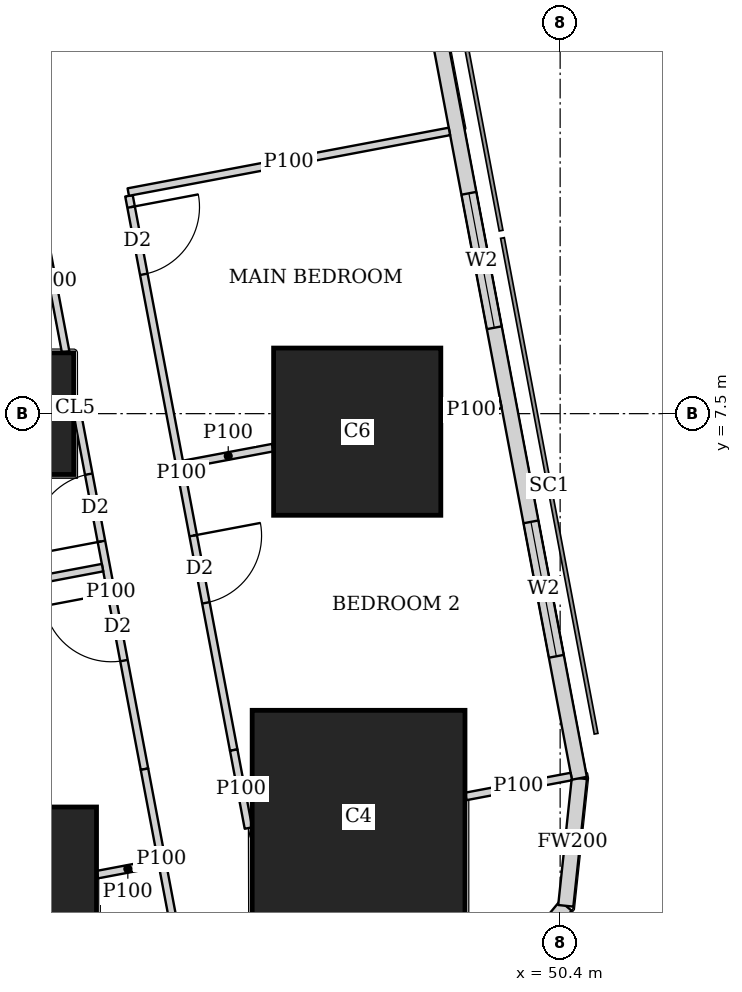
"""IFC4 building model, lengths in metres.
Left out: names, types, materials, properties, quantities, classifications, styles, units other than length and angle.
Written with IfcOpenShell. Run it as: python <this file> out.ifc"""

import sys

from ifc_helpers import new_model, si_unit, direction, frame, frame_2d, origin, origin_2d, place, context, subcontext, project, spatial, rectangle, extrude, element, fill, save


model = new_model("IFC4")
c1 = context("Model", 3, precision=1e-05, world=origin(), true_north=direction((0.0, 1.0)))
c2 = subcontext(c1, "Body", "Model", "MODEL_VIEW")
j1 = project(units=[si_unit("LENGTHUNIT", "METRE"), si_unit("PLANEANGLEUNIT", "RADIAN")], contexts=[c1])
p1 = place(None, origin())
s1 = spatial("IfcSite", under=j1, at=p1, CompositionType="ELEMENT")
p2 = place(p1, origin())
s2 = spatial("IfcBuilding", under=s1, at=p2, CompositionType="ELEMENT")
p3 = place(p2, frame((0.0, 0.0, 81.65)))
s3 = spatial("IfcBuildingStorey", under=s2, at=p3, CompositionType="ELEMENT", Elevation=81.65)
p4 = place(p3, frame((43.2, 1.225, 0.0), z_axis=(0.0, 0.0, 1.0), x_axis=(1.0, 0.0, 0.0)))
e1 = element("IfcColumn", 1, at=p4, inside=s3, PredefinedType="COLUMN", context=c2, shape_type="SweptSolid", body=[
    extrude(rectangle(XDim=2.2, YDim=2.2, at=origin_2d()), origin(), (0.0, 0.0, 1.0), 3.75),
])
p5 = place(p3, frame((47.748, 2.197, 0.0), z_axis=(0.0, 0.0, 1.0), x_axis=(1.0, 0.0, 0.0)))
e2 = element("IfcColumn", 2, at=p5, inside=s3, PredefinedType="COLUMN", context=c2, shape_type="SweptSolid", body=[
    extrude(rectangle(XDim=2.8, YDim=2.8, at=origin_2d()), origin(), (0.0, 0.0, 1.0), 3.75),
])
p6 = place(p3, frame((43.2, 7.5, 0.0), z_axis=(0.0, 0.0, 1.0), x_axis=(1.0, 0.0, 0.0)))
e3 = element("IfcColumn", 3, at=p6, inside=s3, PredefinedType="COLUMN", context=c2, shape_type="SweptSolid", body=[
    extrude(rectangle(XDim=1.6, YDim=1.6, at=origin_2d()), origin(), (0.0, 0.0, 1.0), 3.75),
])
p7 = place(p3, frame((47.73, 7.263, 0.0), z_axis=(0.0, 0.0, 1.0), x_axis=(1.0, 0.0, 0.0)))
e4 = element("IfcColumn", 4, at=p7, inside=s3, PredefinedType="COLUMN", context=c2, shape_type="SweptSolid", body=[
    extrude(rectangle(XDim=2.2, YDim=2.2, at=origin_2d()), origin(), (0.0, 0.0, 1.0), 3.75),
])
p8 = place(p3, frame((49.407, -0.263, 0.0), z_axis=(0.0, 0.0, 1.0), x_axis=(0.638042593423, 0.770001070764, 0.0)))
e5 = element("IfcWall", 5, at=p8, inside=s3, PredefinedType="SOLIDWALL", context=c2, shape_type="SweptSolid", body=[
    extrude(rectangle(XDim=1.673, YDim=0.2, at=frame_2d((0.836, 0.0))), origin(), (0.0, 0.0, 1.0), 3.5),
])
p9 = place(p3, frame((50.474, 1.025, 0.0), z_axis=(0.0, 0.0, 1.0), x_axis=(0.106047815515, 0.994361031429, 0.0)))
e6 = element("IfcWall", 6, at=p9, inside=s3, PredefinedType="SOLIDWALL", context=c2, shape_type="SweptSolid", body=[
    extrude(rectangle(XDim=1.688, YDim=0.2, at=frame_2d((0.844, 0.0))), origin(), (0.0, 0.0, 1.0), 3.5),
])
p10 = place(p3, frame((50.653, 2.703, 0.0), z_axis=(0.0, 0.0, 1.0), x_axis=(-0.185612026696, 0.982623109613, 0.0)))
e7 = element("IfcWall", 7, at=p10, inside=s3, PredefinedType="SOLIDWALL", context=c2, shape_type="SweptSolid", body=[
    extrude(rectangle(XDim=41.393, YDim=0.2, at=frame_2d((20.697, 0.0))), origin(), (0.0, 0.0, 1.0), 3.5),
])
p11 = place(p10, frame((1.633, 0.0, 0.9)))
e8 = element("IfcOpeningElement", 8, at=p11, cuts=e7, PredefinedType="OPENING", context=c2, shape_type="SweptSolid", body=[
    extrude(rectangle(XDim=1.8, YDim=1.5, at=frame_2d((0.9, 0.75))), frame((0.0, 0.11, 0.0), z_axis=(0.0, -1.0, 0.0), x_axis=(1.0, 0.0, 0.0)), (0.0, 0.0, 1.0), 0.22),
])
p12 = place(p10, frame((6.032, 0.0, 0.9)))
e9 = element("IfcOpeningElement", 9, at=p12, cuts=e7, PredefinedType="OPENING", context=c2, shape_type="SweptSolid", body=[
    extrude(rectangle(XDim=1.8, YDim=1.5, at=frame_2d((0.9, 0.75))), frame((0.0, 0.11, 0.0), z_axis=(0.0, -1.0, 0.0), x_axis=(1.0, 0.0, 0.0)), (0.0, 0.0, 1.0), 0.22),
])
p13 = place(p10, frame((9.848, 0.0, 0.9)))
e10 = element("IfcOpeningElement", 10, at=p13, cuts=e7, PredefinedType="OPENING", context=c2, shape_type="SweptSolid", body=[
    extrude(rectangle(XDim=1.8, YDim=1.5, at=frame_2d((0.9, 0.75))), frame((0.0, 0.11, 0.0), z_axis=(0.0, -1.0, 0.0), x_axis=(1.0, 0.0, 0.0)), (0.0, 0.0, 1.0), 0.22),
])
p14 = place(p10, frame((13.664, 0.0, 0.9)))
e11 = element("IfcOpeningElement", 11, at=p14, cuts=e7, PredefinedType="OPENING", context=c2, shape_type="SweptSolid", body=[
    extrude(rectangle(XDim=1.8, YDim=1.5, at=frame_2d((0.9, 0.75))), frame((0.0, 0.11, 0.0), z_axis=(0.0, -1.0, 0.0), x_axis=(1.0, 0.0, 0.0)), (0.0, 0.0, 1.0), 0.22),
])
p15 = place(p10, frame((17.481, 0.0, 0.9)))
e12 = element("IfcOpeningElement", 12, at=p15, cuts=e7, PredefinedType="OPENING", context=c2, shape_type="SweptSolid", body=[
    extrude(rectangle(XDim=1.8, YDim=1.5, at=frame_2d((0.9, 0.75))), frame((0.0, 0.11, 0.0), z_axis=(0.0, -1.0, 0.0), x_axis=(1.0, 0.0, 0.0)), (0.0, 0.0, 1.0), 0.22),
])
p16 = place(p10, frame((21.297, 0.0, 0.9)))
e13 = element("IfcOpeningElement", 13, at=p16, cuts=e7, PredefinedType="OPENING", context=c2, shape_type="SweptSolid", body=[
    extrude(rectangle(XDim=1.8, YDim=1.5, at=frame_2d((0.9, 0.75))), frame((0.0, 0.11, 0.0), z_axis=(0.0, -1.0, 0.0), x_axis=(1.0, 0.0, 0.0)), (0.0, 0.0, 1.0), 0.22),
])
p17 = place(p10, frame((25.113, 0.0, 0.9)))
e14 = element("IfcOpeningElement", 14, at=p17, cuts=e7, PredefinedType="OPENING", context=c2, shape_type="SweptSolid", body=[
    extrude(rectangle(XDim=1.8, YDim=1.5, at=frame_2d((0.9, 0.75))), frame((0.0, 0.11, 0.0), z_axis=(0.0, -1.0, 0.0), x_axis=(1.0, 0.0, 0.0)), (0.0, 0.0, 1.0), 0.22),
])
p18 = place(p10, frame((28.93, 0.0, 0.9)))
e15 = element("IfcOpeningElement", 15, at=p18, cuts=e7, PredefinedType="OPENING", context=c2, shape_type="SweptSolid", body=[
    extrude(rectangle(XDim=1.8, YDim=1.5, at=frame_2d((0.9, 0.75))), frame((0.0, 0.11, 0.0), z_axis=(0.0, -1.0, 0.0), x_axis=(1.0, 0.0, 0.0)), (0.0, 0.0, 1.0), 0.22),
])
p19 = place(p10, frame((32.746, 0.0, 0.9)))
e16 = element("IfcOpeningElement", 16, at=p19, cuts=e7, PredefinedType="OPENING", context=c2, shape_type="SweptSolid", body=[
    extrude(rectangle(XDim=1.8, YDim=1.5, at=frame_2d((0.9, 0.75))), frame((0.0, 0.11, 0.0), z_axis=(0.0, -1.0, 0.0), x_axis=(1.0, 0.0, 0.0)), (0.0, 0.0, 1.0), 0.22),
])
p20 = place(p10, frame((36.481, 0.0, 0.9)))
e17 = element("IfcOpeningElement", 17, at=p20, cuts=e7, PredefinedType="OPENING", context=c2, shape_type="SweptSolid", body=[
    extrude(rectangle(XDim=1.8, YDim=1.5, at=frame_2d((0.9, 0.75))), frame((0.0, 0.11, 0.0), z_axis=(0.0, -1.0, 0.0), x_axis=(1.0, 0.0, 0.0)), (0.0, 0.0, 1.0), 0.22),
])
p21 = place(p3, frame((44.727, 10.366, 0.0), z_axis=(0.0, 0.0, 1.0), x_axis=(0.185678775129, -0.982610498858, 0.0)))
e18 = element("IfcWall", 18, at=p21, inside=s3, PredefinedType="PARTITIONING", context=c2, shape_type="SweptSolid", body=[
    extrude(rectangle(XDim=7.421, YDim=0.1, at=frame_2d((3.71, 0.0))), origin(), (0.0, 0.0, 1.0), 3.5),
])
p22 = place(p21, frame((0.151, 0.0, 0.0)))
e19 = element("IfcOpeningElement", 19, at=p22, cuts=e18, PredefinedType="OPENING", context=c2, shape_type="SweptSolid", body=[
    extrude(rectangle(XDim=0.9, YDim=2.1, at=frame_2d((0.45, 1.05))), frame((0.0, 0.06, 0.0), z_axis=(0.0, -1.0, 0.0), x_axis=(1.0, 0.0, 0.0)), (0.0, 0.0, 1.0), 0.12),
])
p23 = place(p21, frame((4.55, 0.0, 0.0)))
e20 = element("IfcOpeningElement", 20, at=p23, cuts=e18, PredefinedType="OPENING", context=c2, shape_type="SweptSolid", body=[
    extrude(rectangle(XDim=0.9, YDim=2.1, at=frame_2d((0.45, 1.05))), frame((0.0, 0.06, 0.0), z_axis=(0.0, -1.0, 0.0), x_axis=(1.0, 0.0, 0.0)), (0.0, 0.0, 1.0), 0.12),
])
p24 = place(p3, frame((46.105, 3.074, 0.0), z_axis=(0.0, 0.0, 1.0), x_axis=(0.185897769544, -0.982569091351, 0.0)))
e21 = element("IfcWall", 21, at=p24, inside=s3, PredefinedType="PARTITIONING", context=c2, shape_type="SweptSolid", body=[
    extrude(rectangle(XDim=1.044, YDim=0.1, at=frame_2d((0.522, 0.0))), origin(), (0.0, 0.0, 1.0), 2.05),
])
p25 = place(p3, frame((43.539, 10.192, 0.0), z_axis=(0.0, 0.0, 1.0), x_axis=(0.185366049966, -0.982669541362, 0.0)))
e22 = element("IfcWall", 22, at=p25, inside=s3, PredefinedType="PARTITIONING", context=c2, shape_type="SweptSolid", body=[
    extrude(rectangle(XDim=1.915, YDim=0.1, at=frame_2d((0.958, 0.0))), origin(), (0.0, 0.0, 1.0), 3.5),
])
p26 = place(p3, frame((44.049, 7.49, 0.0), z_axis=(0.0, 0.0, 1.0), x_axis=(0.185666332607, -0.982612849975, 0.0)))
e23 = element("IfcWall", 23, at=p26, inside=s3, PredefinedType="PARTITIONING", context=c2, shape_type="SweptSolid", body=[
    extrude(rectangle(XDim=4.75, YDim=0.1, at=frame_2d((2.375, 0.0))), origin(), (0.0, 0.0, 1.0), 3.5),
])
p27 = place(p26, frame((0.8, 0.0, 0.0)))
e24 = element("IfcOpeningElement", 24, at=p27, cuts=e23, PredefinedType="OPENING", context=c2, shape_type="SweptSolid", body=[
    extrude(rectangle(XDim=0.9, YDim=2.1, at=frame_2d((0.45, 1.05))), frame((0.0, 0.06, 0.0), z_axis=(0.0, -1.0, 0.0), x_axis=(1.0, 0.0, 0.0)), (0.0, 0.0, 1.0), 0.12),
])
p28 = place(p26, frame((2.396, 0.0, 0.0)))
e25 = element("IfcOpeningElement", 25, at=p28, cuts=e23, PredefinedType="OPENING", context=c2, shape_type="SweptSolid", body=[
    extrude(rectangle(XDim=0.9, YDim=2.1, at=frame_2d((0.45, 1.05))), frame((0.0, 0.06, 0.0), z_axis=(0.0, -1.0, 0.0), x_axis=(1.0, 0.0, 0.0)), (0.0, 0.0, 1.0), 0.12),
])
p29 = place(p3, frame((44.931, 2.823, 0.0), z_axis=(0.0, 0.0, 1.0), x_axis=(0.185631845838, -0.982619365681, 0.0)))
e26 = element("IfcWall", 26, at=p29, inside=s3, PredefinedType="PARTITIONING", context=c2, shape_type="SweptSolid", body=[
    extrude(rectangle(XDim=2.403, YDim=0.1, at=frame_2d((1.201, 0.0))), origin(), (0.0, 0.0, 1.0), 2.05),
])
p30 = place(p3, frame((48.943, 11.213, 0.0), z_axis=(0.0, 0.0, 1.0), x_axis=(-0.982633535512, -0.185556823879, 0.0)))
e27 = element("IfcWall", 27, at=p30, inside=s3, PredefinedType="PARTITIONING", context=c2, shape_type="SweptSolid", body=[
    extrude(rectangle(XDim=4.3, YDim=0.1, at=frame_2d((2.15, 0.0))), origin(), (0.0, 0.0, 1.0), 2.2),
])
p31 = place(p3, frame((49.622, 7.62, 0.0), z_axis=(0.0, 0.0, 1.0), x_axis=(-0.982512656401, -0.186195810938, 0.0)))
e28 = element("IfcWall", 28, at=p31, inside=s3, PredefinedType="PARTITIONING", context=c2, shape_type="SweptSolid", body=[
    extrude(rectangle(XDim=0.796, YDim=0.1, at=frame_2d((0.398, 0.0))), origin(), (0.0, 0.0, 1.0), 2.05),
])
p32 = place(p3, frame((46.62, 7.053, 0.0), z_axis=(0.0, 0.0, 1.0), x_axis=(-0.982749355621, -0.18494243436, 0.0)))
e29 = element("IfcWall", 29, at=p32, inside=s3, PredefinedType="PARTITIONING", context=c2, shape_type="SweptSolid", body=[
    extrude(rectangle(XDim=1.195, YDim=0.1, at=frame_2d((0.597, 0.0))), origin(), (0.0, 0.0, 1.0), 2.05),
])
p33 = place(p3, frame((50.547, 2.726, 0.0), z_axis=(0.0, 0.0, 1.0), x_axis=(-0.982680053146, -0.185310315822, 0.0)))
e30 = element("IfcWall", 30, at=p33, inside=s3, PredefinedType="PARTITIONING", context=c2, shape_type="SweptSolid", body=[
    extrude(rectangle(XDim=1.414, YDim=0.1, at=frame_2d((0.707, 0.0))), origin(), (0.0, 0.0, 1.0), 3.5),
])
p34 = place(p3, frame((45.114, 1.587, 0.0), z_axis=(0.0, 0.0, 1.0), x_axis=(-0.982624706348, -0.185603573443, 0.0)))
e31 = element("IfcWall", 31, at=p34, inside=s3, PredefinedType="PARTITIONING", context=c2, shape_type="SweptSolid", body=[
    extrude(rectangle(XDim=0.818, YDim=0.1, at=frame_2d((0.409, 0.0))), origin(), (0.0, 0.0, 1.0), 2.05),
])
p35 = place(p3, frame((44.379, 5.474, 0.0), z_axis=(0.0, 0.0, 1.0), x_axis=(-0.982607026909, -0.185697147715, 0.0)))
e32 = element("IfcWall", 32, at=p35, inside=s3, PredefinedType="PARTITIONING", context=c2, shape_type="SweptSolid", body=[
    extrude(rectangle(XDim=3.275, YDim=0.1, at=frame_2d((1.637, 0.0))), origin(), (0.0, 0.0, 1.0), 3.5),
])
p36 = place(p11, origin())
e33 = element("IfcWindow", 33, at=p36, inside=s3, PartitioningType="SINGLE_PANEL", PredefinedType="WINDOW", context=c2, shape_type="SweptSolid", body=[
    extrude(rectangle(XDim=1.8, YDim=1.5, at=frame_2d((0.9, 0.75))), frame((0.0, 0.03, 0.0), z_axis=(0.0, -1.0, 0.0), x_axis=(1.0, 0.0, 0.0)), (0.0, 0.0, 1.0), 0.06),
])
fill(e8, e33)
p37 = place(p12, origin())
e34 = element("IfcWindow", 34, at=p37, inside=s3, PartitioningType="SINGLE_PANEL", PredefinedType="WINDOW", context=c2, shape_type="SweptSolid", body=[
    extrude(rectangle(XDim=1.8, YDim=1.5, at=frame_2d((0.9, 0.75))), frame((0.0, 0.03, 0.0), z_axis=(0.0, -1.0, 0.0), x_axis=(1.0, 0.0, 0.0)), (0.0, 0.0, 1.0), 0.06),
])
fill(e9, e34)
p38 = place(p22, origin())
e35 = element("IfcDoor", 35, at=p38, inside=s3, OperationType="SINGLE_SWING_LEFT", PredefinedType="DOOR", context=c2, shape_type="SweptSolid", body=[
    extrude(rectangle(XDim=0.9, YDim=2.1, at=frame_2d((0.45, 1.05))), frame((0.0, 0.025, 0.0), z_axis=(0.0, -1.0, 0.0), x_axis=(1.0, 0.0, 0.0)), (0.0, 0.0, 1.0), 0.05),
])
fill(e19, e35)
p39 = place(p23, origin())
e36 = element("IfcDoor", 36, at=p39, inside=s3, OperationType="SINGLE_SWING_LEFT", PredefinedType="DOOR", context=c2, shape_type="SweptSolid", body=[
    extrude(rectangle(XDim=0.9, YDim=2.1, at=frame_2d((0.45, 1.05))), frame((0.0, 0.025, 0.0), z_axis=(0.0, -1.0, 0.0), x_axis=(1.0, 0.0, 0.0)), (0.0, 0.0, 1.0), 0.05),
])
fill(e20, e36)
p40 = place(p27, origin())
e37 = element("IfcDoor", 37, at=p40, inside=s3, OperationType="SINGLE_SWING_LEFT", PredefinedType="DOOR", context=c2, shape_type="SweptSolid", body=[
    extrude(rectangle(XDim=0.9, YDim=2.1, at=frame_2d((0.45, 1.05))), frame((0.0, 0.025, 0.0), z_axis=(0.0, -1.0, 0.0), x_axis=(1.0, 0.0, 0.0)), (0.0, 0.0, 1.0), 0.05),
])
fill(e24, e37)
p41 = place(p28, origin())
e38 = element("IfcDoor", 38, at=p41, inside=s3, OperationType="SINGLE_SWING_RIGHT", PredefinedType="DOOR", context=c2, shape_type="SweptSolid", body=[
    extrude(rectangle(XDim=0.9, YDim=2.1, at=frame_2d((0.45, 1.05))), frame((0.0, 0.025, 0.0), z_axis=(0.0, -1.0, 0.0), x_axis=(1.0, 0.0, 0.0)), (0.0, 0.0, 1.0), 0.05),
])
fill(e25, e38)
save(model, sys.argv[1])
